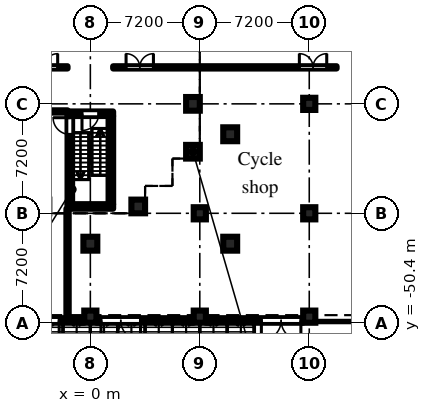
"""IFC4 building model, lengths in metres.
Left out: names, types, materials, properties, quantities, classifications, styles, units other than length and angle.
Written with IfcOpenShell. Run it as: python <this file> out.ifc"""

import sys

from ifc_helpers import new_model, si_unit, direction, frame, frame_2d, origin, origin_2d, place, context, subcontext, project, spatial, rectangle, hollow_circle, extrude, element, fill, save


model = new_model("IFC4")
c1 = context("Model", 3, precision=1e-05, world=origin(), true_north=direction((0.0, 1.0)))
c2 = subcontext(c1, "Body", "Model", "MODEL_VIEW")
j1 = project(units=[si_unit("LENGTHUNIT", "METRE"), si_unit("PLANEANGLEUNIT", "RADIAN")], contexts=[c1])
p1 = place(None, origin())
s1 = spatial("IfcSite", under=j1, at=p1, CompositionType="ELEMENT")
p2 = place(p1, origin())
s2 = spatial("IfcBuilding", under=s1, at=p2, CompositionType="ELEMENT")
p3 = place(p2, origin())
s3 = spatial("IfcBuildingStorey", under=s2, at=p3, CompositionType="ELEMENT", Elevation=0.0)
for number, where, z_axis, x_axis in (
    (1, (3.15, -42.75, 0.0), (0.0, 0.0, 1.0), (1.0, 0.0, 0.0)),
    (2, (6.75, -39.15, 0.0), (0.0, 0.0, 1.0), (1.0, 0.0, 0.0)),
    (3, (6.75, -36.0, 0.0), (0.0, 0.0, 1.0), (1.0, 0.0, 0.0)),
):
    element("IfcColumn", number, at=place(p3, frame(where, z_axis=z_axis, x_axis=x_axis)), inside=s3, PredefinedType="COLUMN", context=c2, shape_type="SweptSolid", body=[
        extrude(rectangle(XDim=0.9, YDim=0.9, at=origin_2d()), origin(), (0.0, 0.0, 1.0), 7.2),
    ])
for number, where, z_axis, x_axis in (
    (4, (0.0, -50.0, 0.0), (0.0, 0.0, 1.0), (1.0, 0.0, 0.0)),
    (5, (7.2, -50.0, 0.0), (0.0, 0.0, 1.0), (1.0, 0.0, 0.0)),
    (6, (7.2, -43.2, 0.0), (0.0, 0.0, 1.0), (1.0, 0.0, 0.0)),
    (7, (14.4, -50.0, 0.0), (0.0, 0.0, 1.0), (1.0, 0.0, 0.0)),
    (8, (14.4, -43.2, 0.0), (0.0, 0.0, 1.0), (1.0, 0.0, 0.0)),
    (9, (14.4, -36.0, 0.0), (0.0, 0.0, 1.0), (1.0, 0.0, 0.0)),
):
    element("IfcColumn", number, at=place(p3, frame(where, z_axis=z_axis, x_axis=x_axis)), inside=s3, PredefinedType="COLUMN", context=c2, shape_type="SweptSolid", body=[
        extrude(rectangle(XDim=0.8, YDim=0.8, at=origin_2d()), origin(), (0.0, 0.0, 1.0), 6.6),
    ])
for number, where, z_axis, x_axis in (
    (10, (0.0, -45.2, 0.0), (0.0, 0.0, 1.0), (1.0, 0.0, 0.0)),
    (11, (9.2, -45.2, 0.0), (0.0, 0.0, 1.0), (1.0, 0.0, 0.0)),
    (12, (9.2, -38.0, 0.0), (0.0, 0.0, 1.0), (1.0, 0.0, 0.0)),
):
    element("IfcColumn", number, at=place(p3, frame(where, z_axis=z_axis, x_axis=x_axis)), inside=s3, PredefinedType="COLUMN", context=c2, shape_type="SweptSolid", body=[
        extrude(hollow_circle(Radius=0.457, WallThickness=0.05, at=origin_2d()), origin(), (0.0, 0.0, 1.0), 7.5),
    ])
p4 = place(p3, frame((-6.8, -50.25, 0.0), z_axis=(0.0, 0.0, 1.0), x_axis=(1.0, 0.0, 0.0)))
e13 = element("IfcWall", 13, at=p4, inside=s3, PredefinedType="SOLIDWALL", context=c2, shape_type="SweptSolid", body=[
    extrude(rectangle(XDim=6.4, YDim=0.3, at=frame_2d((3.2, 0.0))), origin(), (0.0, 0.0, 1.0), 6.6),
])
p5 = place(p4, frame((3.45, 0.0, 0.0)))
e14 = element("IfcOpeningElement", 14, at=p5, cuts=e13, PredefinedType="OPENING", context=c2, shape_type="SweptSolid", body=[
    extrude(rectangle(XDim=1.3, YDim=2.1, at=frame_2d((0.65, 1.05))), frame((0.0, 0.16, 0.0), z_axis=(0.0, -1.0, 0.0), x_axis=(1.0, 0.0, 0.0)), (0.0, 0.0, 1.0), 0.32),
])
p6 = place(p3, frame((0.4, -50.25, 0.0), z_axis=(0.0, 0.0, 1.0), x_axis=(1.0, 0.0, 0.0)))
e15 = element("IfcWall", 15, at=p6, inside=s3, PredefinedType="SOLIDWALL", context=c2, shape_type="SweptSolid", body=[
    extrude(rectangle(XDim=6.4, YDim=0.3, at=frame_2d((3.2, 0.0))), origin(), (0.0, 0.0, 1.0), 6.6),
])
p7 = place(p6, frame((0.3, 0.0, 0.0)))
e16 = element("IfcOpeningElement", 16, at=p7, cuts=e15, PredefinedType="OPENING", context=c2, shape_type="SweptSolid", body=[
    extrude(rectangle(XDim=2.6, YDim=2.4, at=frame_2d((1.3, 1.2))), frame((0.0, 0.16, 0.0), z_axis=(0.0, -1.0, 0.0), x_axis=(1.0, 0.0, 0.0)), (0.0, 0.0, 1.0), 0.32),
])
p8 = place(p3, frame((7.6, -50.25, 0.0), z_axis=(0.0, 0.0, 1.0), x_axis=(1.0, 0.0, 0.0)))
e17 = element("IfcWall", 17, at=p8, inside=s3, PredefinedType="SOLIDWALL", context=c2, shape_type="SweptSolid", body=[
    extrude(rectangle(XDim=6.4, YDim=0.3, at=frame_2d((3.2, 0.0))), origin(), (0.0, 0.0, 1.0), 6.6),
])
p9 = place(p8, frame((3.65, 0.0, 0.0)))
e18 = element("IfcOpeningElement", 18, at=p9, cuts=e17, PredefinedType="OPENING", context=c2, shape_type="SweptSolid", body=[
    extrude(rectangle(XDim=2.6, YDim=2.4, at=frame_2d((1.3, 1.2))), frame((0.0, 0.16, 0.0), z_axis=(0.0, -1.0, 0.0), x_axis=(1.0, 0.0, 0.0)), (0.0, 0.0, 1.0), 0.32),
])
p10 = place(p3, frame((-1.5, -36.65, 0.0), z_axis=(0.0, 0.0, 1.0), x_axis=(1.0, 0.0, 0.0)))
e19 = element("IfcWall", 19, at=p10, inside=s3, PredefinedType="SHEAR", context=c2, shape_type="SweptSolid", body=[
    extrude(rectangle(XDim=3.0, YDim=0.3, at=frame_2d((1.5, 0.0))), origin(), (0.0, 0.0, 1.0), 6.6),
])
p11 = place(p10, frame((0.95, 0.0, 0.0)))
e20 = element("IfcOpeningElement", 20, at=p11, cuts=e19, PredefinedType="OPENING", context=c2, shape_type="SweptSolid", body=[
    extrude(rectangle(XDim=1.1, YDim=2.1, at=frame_2d((0.55, 1.05))), frame((0.0, 0.16, 0.0), z_axis=(0.0, -1.0, 0.0), x_axis=(1.0, 0.0, 0.0)), (0.0, 0.0, 1.0), 0.32),
])
p12 = place(p3, frame((-1.5, -42.75, 0.0), z_axis=(0.0, 0.0, 1.0), x_axis=(1.0, 0.0, 0.0)))
e21 = element("IfcWall", 21, at=p12, inside=s3, PredefinedType="SHEAR", context=c2, shape_type="SweptSolid", body=[
    extrude(rectangle(XDim=3.0, YDim=0.3, at=frame_2d((1.5, 0.0))), origin(), (0.0, 0.0, 1.0), 6.6),
])
p13 = place(p3, frame((-1.35, -36.8, 0.0), z_axis=(0.0, 0.0, 1.0), x_axis=(0.0, -1.0, 0.0)))
e22 = element("IfcWall", 22, at=p13, inside=s3, PredefinedType="SHEAR", context=c2, shape_type="SweptSolid", body=[
    extrude(rectangle(XDim=5.8, YDim=0.3, at=frame_2d((2.9, 0.0))), origin(), (0.0, 0.0, 1.0), 6.6),
])
p14 = place(p13, frame((0.11, 0.0, 0.0)))
e23 = element("IfcOpeningElement", 23, at=p14, cuts=e22, PredefinedType="OPENING", context=c2, shape_type="SweptSolid", body=[
    extrude(rectangle(XDim=1.1, YDim=2.1, at=frame_2d((0.55, 1.05))), frame((0.0, 0.16, 0.0), z_axis=(0.0, -1.0, 0.0), x_axis=(1.0, 0.0, 0.0)), (0.0, 0.0, 1.0), 0.32),
])
p15 = place(p3, frame((1.35, -36.8, 0.0), z_axis=(0.0, 0.0, 1.0), x_axis=(0.0, -1.0, 0.0)))
e24 = element("IfcWall", 24, at=p15, inside=s3, PredefinedType="SHEAR", context=c2, shape_type="SweptSolid", body=[
    extrude(rectangle(XDim=5.8, YDim=0.3, at=frame_2d((2.9, 0.0))), origin(), (0.0, 0.0, 1.0), 6.6),
])
p16 = place(p3, frame((-16.2, -33.6, 0.0), z_axis=(0.0, 0.0, 1.0), x_axis=(1.0, 0.0, 0.0)))
e25 = element("IfcWall", 25, at=p16, inside=s3, PredefinedType="PARTITIONING", context=c2, shape_type="SweptSolid", body=[
    extrude(rectangle(XDim=14.7, YDim=0.15, at=frame_2d((7.35, 0.0))), origin(), (0.0, 0.0, 1.0), 6.6),
])
p17 = place(p16, frame((0.85, 0.0, 0.0)))
e26 = element("IfcOpeningElement", 26, at=p17, cuts=e25, PredefinedType="OPENING", context=c2, shape_type="SweptSolid", body=[
    extrude(rectangle(XDim=1.8, YDim=2.1, at=frame_2d((0.9, 1.05))), frame((0.0, 0.085, 0.0), z_axis=(0.0, -1.0, 0.0), x_axis=(1.0, 0.0, 0.0)), (0.0, 0.0, 1.0), 0.17),
])
p18 = place(p16, frame((12.25, 0.0, 0.0)))
e27 = element("IfcOpeningElement", 27, at=p18, cuts=e25, PredefinedType="OPENING", context=c2, shape_type="SweptSolid", body=[
    extrude(rectangle(XDim=1.8, YDim=2.1, at=frame_2d((0.9, 1.05))), frame((0.0, 0.085, 0.0), z_axis=(0.0, -1.0, 0.0), x_axis=(1.0, 0.0, 0.0)), (0.0, 0.0, 1.0), 0.17),
])
p19 = place(p3, frame((-3.825, -36.5, 0.0), z_axis=(0.0, 0.0, 1.0), x_axis=(1.0, 0.0, 0.0)))
e28 = element("IfcWall", 28, at=p19, inside=s3, PredefinedType="PARTITIONING", context=c2, shape_type="SweptSolid", body=[
    extrude(rectangle(XDim=2.325, YDim=0.15, at=frame_2d((1.163, 0.0))), origin(), (0.0, 0.0, 1.0), 6.6),
])
p20 = place(p3, frame((-1.5, -50.22, 0.0), z_axis=(0.0, 0.0, 1.0), x_axis=(0.0, 1.0, 0.0)))
e29 = element("IfcWall", 29, at=p20, inside=s3, PredefinedType="PARTITIONING", context=c2, shape_type="SweptSolid", body=[
    extrude(rectangle(XDim=7.32, YDim=0.15, at=frame_2d((3.66, 0.0))), origin(), (0.0, 0.0, 1.0), 6.6),
])
p21 = place(p3, frame((1.5, -33.6, 0.0), z_axis=(0.0, 0.0, 1.0), x_axis=(1.0, 0.0, 0.0)))
e30 = element("IfcWall", 30, at=p21, inside=s3, PredefinedType="PARTITIONING", context=c2, shape_type="SweptSolid", body=[
    extrude(rectangle(XDim=14.7, YDim=0.15, at=frame_2d((7.35, 0.0))), origin(), (0.0, 0.0, 1.0), 6.6),
])
p22 = place(p21, frame((0.85, 0.0, 0.0)))
e31 = element("IfcOpeningElement", 31, at=p22, cuts=e30, PredefinedType="OPENING", context=c2, shape_type="SweptSolid", body=[
    extrude(rectangle(XDim=1.8, YDim=2.1, at=frame_2d((0.9, 1.05))), frame((0.0, 0.085, 0.0), z_axis=(0.0, -1.0, 0.0), x_axis=(1.0, 0.0, 0.0)), (0.0, 0.0, 1.0), 0.17),
])
p23 = place(p21, frame((12.25, 0.0, 0.0)))
e32 = element("IfcOpeningElement", 32, at=p23, cuts=e30, PredefinedType="OPENING", context=c2, shape_type="SweptSolid", body=[
    extrude(rectangle(XDim=1.8, YDim=2.1, at=frame_2d((0.9, 1.05))), frame((0.0, 0.085, 0.0), z_axis=(0.0, -1.0, 0.0), x_axis=(1.0, 0.0, 0.0)), (0.0, 0.0, 1.0), 0.17),
])
p24 = place(p5, frame((1.3, 0.0, 0.0), z_axis=(0.0, 0.0, 1.0), x_axis=(-1.0, 0.0, 0.0)))
e33 = element("IfcDoor", 33, at=p24, inside=s3, OperationType="SINGLE_SWING_LEFT", PredefinedType="DOOR", context=c2, shape_type="SweptSolid", body=[
    extrude(rectangle(XDim=1.3, YDim=2.1, at=frame_2d((0.65, 1.05))), frame((0.0, 0.025, 0.0), z_axis=(0.0, -1.0, 0.0), x_axis=(1.0, 0.0, 0.0)), (0.0, 0.0, 1.0), 0.05),
])
fill(e14, e33)
p25 = place(p7, frame((2.6, 0.0, 0.0), z_axis=(0.0, 0.0, 1.0), x_axis=(-1.0, 0.0, 0.0)))
e34 = element("IfcDoor", 34, at=p25, inside=s3, OperationType="DOUBLE_DOOR_DOUBLE_SWING", PredefinedType="DOOR", context=c2, shape_type="SweptSolid", body=[
    extrude(rectangle(XDim=2.6, YDim=2.4, at=frame_2d((1.3, 1.2))), frame((0.0, 0.025, 0.0), z_axis=(0.0, -1.0, 0.0), x_axis=(1.0, 0.0, 0.0)), (0.0, 0.0, 1.0), 0.05),
])
fill(e16, e34)
p26 = place(p9, frame((2.6, 0.0, 0.0), z_axis=(0.0, 0.0, 1.0), x_axis=(-1.0, 0.0, 0.0)))
e35 = element("IfcDoor", 35, at=p26, inside=s3, OperationType="DOUBLE_DOOR_DOUBLE_SWING", PredefinedType="DOOR", context=c2, shape_type="SweptSolid", body=[
    extrude(rectangle(XDim=2.6, YDim=2.4, at=frame_2d((1.3, 1.2))), frame((0.0, 0.025, 0.0), z_axis=(0.0, -1.0, 0.0), x_axis=(1.0, 0.0, 0.0)), (0.0, 0.0, 1.0), 0.05),
])
fill(e18, e35)
p27 = place(p11, frame((1.1, 0.0, 0.0), z_axis=(0.0, 0.0, 1.0), x_axis=(-1.0, 0.0, 0.0)))
e36 = element("IfcDoor", 36, at=p27, inside=s3, OperationType="SINGLE_SWING_RIGHT", PredefinedType="DOOR", context=c2, shape_type="SweptSolid", body=[
    extrude(rectangle(XDim=1.1, YDim=2.1, at=frame_2d((0.55, 1.05))), frame((0.0, 0.025, 0.0), z_axis=(0.0, -1.0, 0.0), x_axis=(1.0, 0.0, 0.0)), (0.0, 0.0, 1.0), 0.05),
])
fill(e20, e36)
p28 = place(p14, frame((1.1, 0.0, 0.0), z_axis=(0.0, 0.0, 1.0), x_axis=(-1.0, 0.0, 0.0)))
e37 = element("IfcDoor", 37, at=p28, inside=s3, OperationType="SINGLE_SWING_RIGHT", PredefinedType="DOOR", context=c2, shape_type="SweptSolid", body=[
    extrude(rectangle(XDim=1.1, YDim=2.1, at=frame_2d((0.55, 1.05))), frame((0.0, 0.025, 0.0), z_axis=(0.0, -1.0, 0.0), x_axis=(1.0, 0.0, 0.0)), (0.0, 0.0, 1.0), 0.05),
])
fill(e23, e37)
p29 = place(p18, origin())
e38 = element("IfcDoor", 38, at=p29, inside=s3, OperationType="DOUBLE_DOOR_DOUBLE_SWING", PredefinedType="DOOR", context=c2, shape_type="SweptSolid", body=[
    extrude(rectangle(XDim=1.8, YDim=2.1, at=frame_2d((0.9, 1.05))), frame((0.0, 0.025, 0.0), z_axis=(0.0, -1.0, 0.0), x_axis=(1.0, 0.0, 0.0)), (0.0, 0.0, 1.0), 0.05),
])
fill(e27, e38)
p30 = place(p22, origin())
e39 = element("IfcDoor", 39, at=p30, inside=s3, OperationType="DOUBLE_DOOR_DOUBLE_SWING", PredefinedType="DOOR", context=c2, shape_type="SweptSolid", body=[
    extrude(rectangle(XDim=1.8, YDim=2.1, at=frame_2d((0.9, 1.05))), frame((0.0, 0.025, 0.0), z_axis=(0.0, -1.0, 0.0), x_axis=(1.0, 0.0, 0.0)), (0.0, 0.0, 1.0), 0.05),
])
fill(e31, e39)
p31 = place(p23, origin())
e40 = element("IfcDoor", 40, at=p31, inside=s3, OperationType="DOUBLE_DOOR_DOUBLE_SWING", PredefinedType="DOOR", context=c2, shape_type="SweptSolid", body=[
    extrude(rectangle(XDim=1.8, YDim=2.1, at=frame_2d((0.9, 1.05))), frame((0.0, 0.025, 0.0), z_axis=(0.0, -1.0, 0.0), x_axis=(1.0, 0.0, 0.0)), (0.0, 0.0, 1.0), 0.05),
])
fill(e32, e40)
save(model, sys.argv[1])
